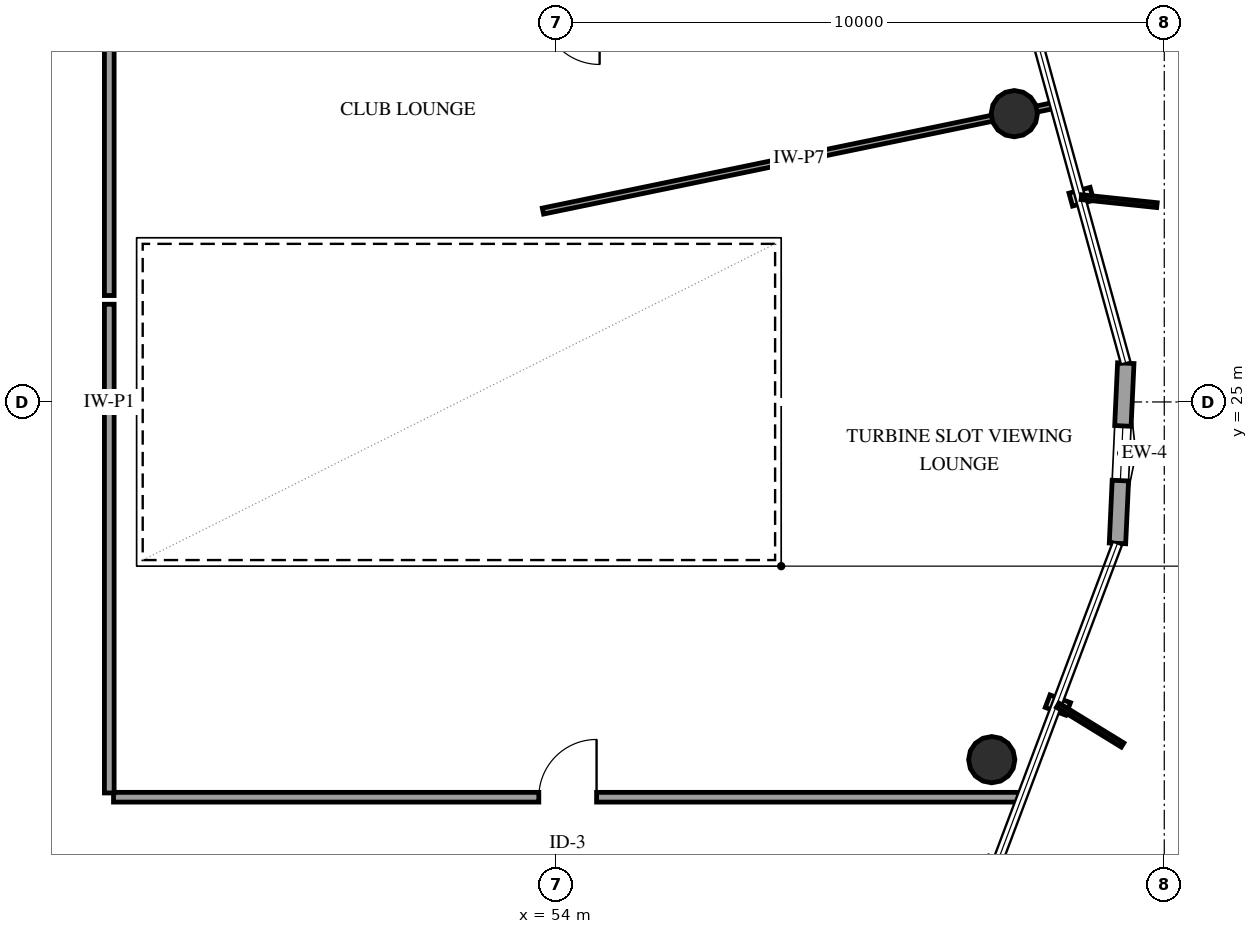
"""IFC4 building model, lengths in metres.
Left out: names, types, materials, properties, quantities, classifications, styles, units other than length and angle.
Written with IfcOpenShell. Run it as: python <this file> out.ifc"""

import sys

from ifc_helpers import new_model, si_unit, direction, frame, frame_2d, origin, origin_2d, place, context, subcontext, project, spatial, rectangle, hollow_circle, extrude, element, fill, save


model = new_model("IFC4")
c1 = context("Model", 3, precision=1e-05, world=origin(), true_north=direction((0.0, 1.0)))
c2 = subcontext(c1, "Body", "Model", "MODEL_VIEW")
j1 = project(units=[si_unit("LENGTHUNIT", "METRE"), si_unit("PLANEANGLEUNIT", "RADIAN")], contexts=[c1])
p1 = place(None, origin())
s1 = spatial("IfcSite", under=j1, at=p1, CompositionType="ELEMENT")
p2 = place(p1, origin())
s2 = spatial("IfcBuilding", under=s1, at=p2, CompositionType="ELEMENT")
p3 = place(p2, frame((0.0, 0.0, 288.55)))
s3 = spatial("IfcBuildingStorey", under=s2, at=p3, CompositionType="ELEMENT", Elevation=288.55)
for number, where, z_axis, x_axis in (
    (1, (61.534, 29.741, 0.0), (0.0, 0.0, 1.0), (1.0, 0.0, 0.0)),
    (2, (61.163, 19.117, 0.0), (0.0, 0.0, 1.0), (1.0, 0.0, 0.0)),
):
    element("IfcColumn", number, at=place(p3, frame(where, z_axis=z_axis, x_axis=x_axis)), inside=s3, PredefinedType="COLUMN", context=c2, shape_type="SweptSolid", body=[
        extrude(hollow_circle(Radius=0.381, WallThickness=0.025, at=origin_2d()), origin(), (0.0, 0.0, 1.0), 4.165),
    ])
p4 = place(p3, frame((63.23, 22.675, 0.0), z_axis=(0.0, 0.0, 1.0), x_axis=(0.046087078481, 0.998937426067, 0.0)))
e3 = element("IfcWall", 3, at=p4, inside=s3, PredefinedType="SOLIDWALL", context=c2, shape_type="SweptSolid", body=[
    extrude(rectangle(XDim=2.967, YDim=0.27, at=frame_2d((1.483, 0.0))), origin(), (0.0, 0.0, 1.0), 3.574),
])
p5 = place(p4, frame((1.033, 0.0, 0.75)))
e4 = element("IfcOpeningElement", 4, at=p5, cuts=e3, PredefinedType="OPENING", context=c2, shape_type="SweptSolid", body=[
    extrude(rectangle(XDim=0.9, YDim=1.5, at=frame_2d((0.45, 0.75))), frame((0.0, 0.145, 0.0), z_axis=(0.0, -1.0, 0.0), x_axis=(1.0, 0.0, 0.0)), (0.0, 0.0, 1.0), 0.29),
])
p6 = place(p3, frame((46.72, 18.5, 0.0), z_axis=(0.0, 0.0, 1.0), x_axis=(1.0, 0.0, 0.0)))
e5 = element("IfcWall", 5, at=p6, inside=s3, PredefinedType="PARTITIONING", context=c2, shape_type="SweptSolid", body=[
    extrude(rectangle(XDim=14.938, YDim=0.16, at=frame_2d((7.469, 0.0))), origin(), (0.0, 0.0, 1.0), 2.485),
])
p7 = place(p6, frame((6.994, 0.0, 0.0)))
e6 = element("IfcOpeningElement", 6, at=p7, cuts=e5, PredefinedType="OPENING", context=c2, shape_type="SweptSolid", body=[
    extrude(rectangle(XDim=0.95, YDim=2.15, at=frame_2d((0.475, 1.075))), frame((0.0, 0.09, 0.0), z_axis=(0.0, -1.0, 0.0), x_axis=(1.0, 0.0, 0.0)), (0.0, 0.0, 1.0), 0.18),
])
p8 = place(p3, frame((46.65, 26.607, 0.0), z_axis=(0.0, 0.0, 1.0), x_axis=(0.0, -1.0, 0.0)))
e7 = element("IfcWall", 7, at=p8, inside=s3, PredefinedType="PARTITIONING", context=c2, shape_type="SweptSolid", body=[
    extrude(rectangle(XDim=8.037, YDim=0.16, at=frame_2d((4.019, 0.0))), origin(), (0.0, 0.0, 1.0), 4.195),
])
p9 = place(p3, frame((46.65, 31.43, 0.0), z_axis=(0.0, 0.0, 1.0), x_axis=(0.0, -1.0, 0.0)))
e8 = element("IfcWall", 8, at=p9, inside=s3, PredefinedType="PARTITIONING", context=c2, shape_type="SweptSolid", body=[
    extrude(rectangle(XDim=4.68, YDim=0.16, at=frame_2d((2.34, 0.0))), origin(), (0.0, 0.0, 1.0), 4.195),
])
p10 = place(p3, frame((62.202, 29.879, 0.0), z_axis=(0.0, 0.0, 1.0), x_axis=(-0.97930798833, -0.202375551868, 0.0)))
e9 = element("IfcWall", 9, at=p10, inside=s3, PredefinedType="PARTITIONING", context=c2, shape_type="SweptSolid", body=[
    extrude(rectangle(XDim=8.598, YDim=0.1, at=frame_2d((4.299, 0.0))), origin(), (0.0, 0.0, 1.0), 2.485),
])
p11 = place(p5, origin())
e10 = element("IfcWindow", 10, at=p11, inside=s3, PartitioningType="SINGLE_PANEL", PredefinedType="WINDOW", context=c2, shape_type="SweptSolid", body=[
    extrude(rectangle(XDim=0.9, YDim=1.5, at=frame_2d((0.45, 0.75))), frame((0.0, 0.03, 0.0), z_axis=(0.0, -1.0, 0.0), x_axis=(1.0, 0.0, 0.0)), (0.0, 0.0, 1.0), 0.06),
])
fill(e4, e10)
p12 = place(p7, origin())
e11 = element("IfcDoor", 11, at=p12, inside=s3, OperationType="SINGLE_SWING_RIGHT", PredefinedType="DOOR", context=c2, shape_type="SweptSolid", body=[
    extrude(rectangle(XDim=0.95, YDim=2.15, at=frame_2d((0.475, 1.075))), frame((0.0, 0.025, 0.0), z_axis=(0.0, -1.0, 0.0), x_axis=(1.0, 0.0, 0.0)), (0.0, 0.0, 1.0), 0.05),
])
fill(e6, e11)
save(model, sys.argv[1])
